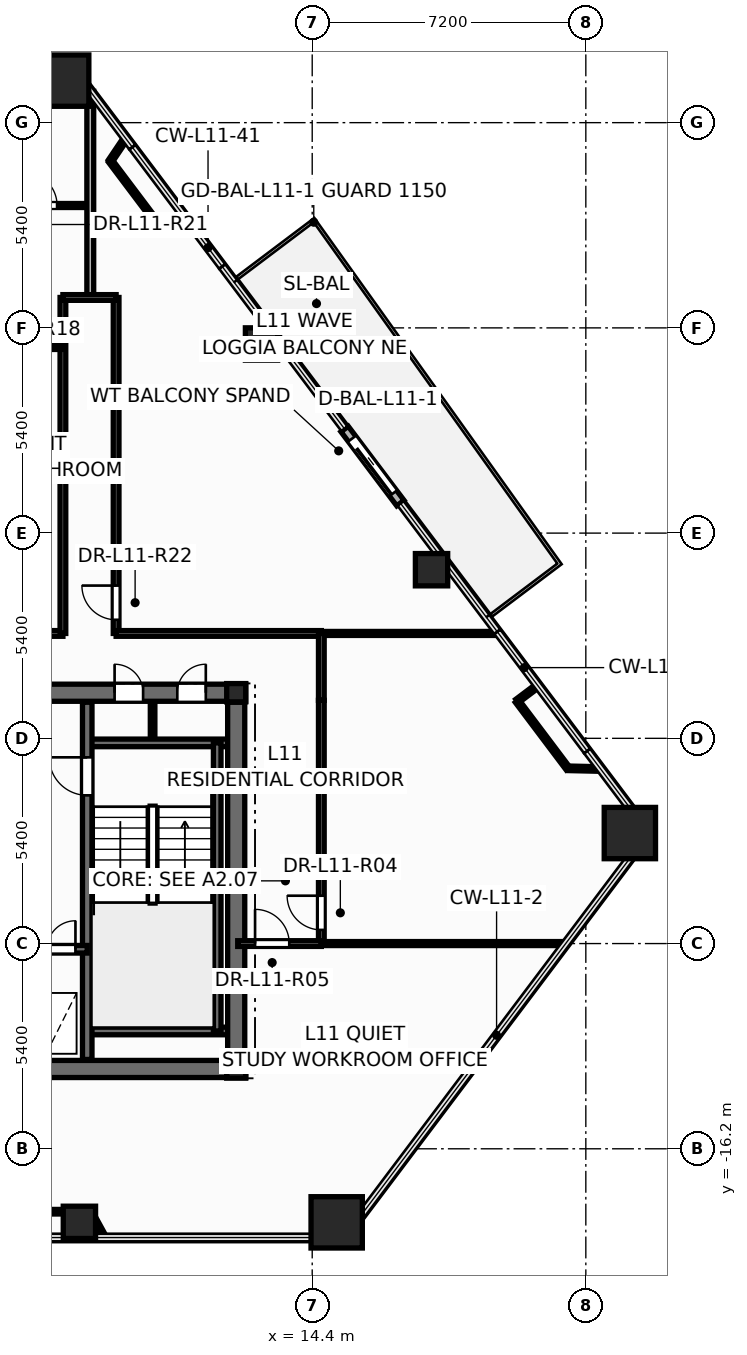
"""IFC4 building model, lengths in metres.
Left out: names, types, materials, properties, quantities, classifications, styles, units other than length and angle.
Written with IfcOpenShell. Run it as: python <this file> out.ifc"""

import sys

from ifc_helpers import new_model, si_unit, direction, frame, frame_2d, origin, origin_2d, place, context, subcontext, project, spatial, rectangle, hollow_rectangle, hollow_circle, i_section, extrude, element, fill, save


model = new_model("IFC4")
c1 = context("Model", 3, precision=1e-05, world=origin(), true_north=direction((0.0, 1.0)))
c2 = subcontext(c1, "Body", "Model", "MODEL_VIEW")
j1 = project(units=[si_unit("LENGTHUNIT", "METRE"), si_unit("PLANEANGLEUNIT", "RADIAN")], contexts=[c1])
p1 = place(None, origin())
s1 = spatial("IfcSite", under=j1, at=p1, CompositionType="ELEMENT")
p2 = place(p1, origin())
s2 = spatial("IfcBuilding", under=s1, at=p2, CompositionType="ELEMENT")
p3 = place(p2, frame((0.0, 0.0, 45.9)))
s3 = spatial("IfcBuildingStorey", under=s2, at=p3, CompositionType="ELEMENT", Elevation=45.9)
for number, where, z_axis, x_axis in (
    (1, (15.044, -18.135, 0.0), (0.0, 0.0, 1.0), (1.0, 0.0, 0.0)),
    (2, (22.759, -7.892, 0.0), (0.0, 0.0, 1.0), (1.0, 0.0, 0.0)),
    (3, (7.847, 11.906, 0.0), (0.0, 0.0, 1.0), (1.0, 0.0, 0.0)),
):
    element("IfcColumn", number, at=place(p3, frame(where, z_axis=z_axis, x_axis=x_axis)), inside=s3, PredefinedType="COLUMN", context=c2, shape_type="SweptSolid", body=[
        extrude(hollow_rectangle(XDim=1.35, YDim=1.35, WallThickness=0.065, at=origin_2d()), origin(), (0.0, 0.0, 1.0), 3.6),
    ])
for number, where, z_axis, x_axis in (
    (4, (8.274, -18.135, 0.0), (0.0, 0.0, 1.0), (1.0, 0.0, 0.0)),
    (5, (17.54, -0.963, 0.0), (0.0, 0.0, 1.0), (1.0, 0.0, 0.0)),
    (6, (13.066, 4.976, 0.0), (0.0, 0.0, 1.0), (1.0, 0.0, 0.0)),
):
    element("IfcColumn", number, at=place(p3, frame(where, z_axis=z_axis, x_axis=x_axis)), inside=s3, PredefinedType="COLUMN", context=c2, shape_type="SweptSolid", body=[
        extrude(hollow_circle(Radius=0.425, WallThickness=0.038, at=origin_2d()), origin(), (0.0, 0.0, 1.0), 3.6),
    ])
for number, where, z_axis, x_axis in (
    (7, (12.4, -14.1, 0.0), (0.0, 0.0, 1.0), (1.0, 0.0, 0.0)),
    (8, (12.4, -4.2, 0.0), (0.0, 0.0, 1.0), (1.0, 0.0, 0.0)),
):
    element("IfcColumn", number, at=place(p3, frame(where, z_axis=z_axis, x_axis=x_axis)), inside=s3, PredefinedType="COLUMN", context=c2, shape_type="SweptSolid", body=[
        extrude(i_section(OverallWidth=0.5, OverallDepth=0.482, WebThickness=0.04, FlangeThickness=0.045, at=origin_2d()), origin(), (0.0, 0.0, 1.0), 3.6),
    ])
p4 = place(p3, frame((16.72, 0.79, -0.015), z_axis=(0.0, 0.0, 1.0), x_axis=(-0.601647678338, 0.798761585926, 0.0)))
e9 = element("IfcWall", 9, at=p4, inside=s3, PredefinedType="STANDARD", context=c2, shape_type="SweptSolid", body=[
    extrude(rectangle(XDim=2.44, YDim=0.24, at=frame_2d((1.22, 0.0))), origin(), (0.0, 0.0, 1.0), 2.728),
])
p5 = place(p4, frame((0.32, 0.0, 0.015)))
e10 = element("IfcOpeningElement", 10, at=p5, cuts=e9, PredefinedType="OPENING", context=c2, shape_type="SweptSolid", body=[
    extrude(rectangle(XDim=1.806, YDim=2.204, at=frame_2d((0.9, 1.102))), frame((0.0, 0.13, 0.0), z_axis=(0.0, -1.0, 0.0), x_axis=(1.0, 0.0, 0.0)), (0.0, 0.0, 1.0), 0.26),
])
p6 = place(p3, frame((10.2, -5.52, 0.0), z_axis=(0.0, 0.0, 1.0), x_axis=(0.0, 1.0, 0.0)))
e11 = element("IfcWall", 11, at=p6, inside=s3, PredefinedType="PARTITIONING", context=c2, shape_type="SweptSolid", body=[
    extrude(rectangle(XDim=1.12, YDim=0.12, at=frame_2d((0.56, 0.0))), origin(), (0.0, 0.0, 1.0), 3.35),
])
p7 = place(p3, frame((-12.65, -14.1, 0.0), z_axis=(0.0, 0.0, 1.0), x_axis=(1.0, 0.0, 0.0)))
e12 = element("IfcWall", 12, at=p7, inside=s3, PredefinedType="SHEAR", context=c2, shape_type="SweptSolid", body=[
    extrude(rectangle(XDim=25.3, YDim=0.45, at=frame_2d((12.65, 0.0))), origin(), (0.0, 0.0, 1.0), 3.6),
])
p8 = place(p3, frame((-12.65, -4.2, 0.0), z_axis=(0.0, 0.0, 1.0), x_axis=(1.0, 0.0, 0.0)))
e13 = element("IfcWall", 13, at=p8, inside=s3, PredefinedType="SHEAR", context=c2, shape_type="SweptSolid", body=[
    extrude(rectangle(XDim=25.3, YDim=0.45, at=frame_2d((12.65, 0.0))), origin(), (0.0, 0.0, 1.0), 3.6),
])
p9 = place(p8, frame((0.95, 0.0, 0.0)))
e14 = element("IfcOpeningElement", 14, at=p9, cuts=e13, PredefinedType="OPENING", context=c2, shape_type="SweptSolid", body=[
    extrude(rectangle(XDim=0.756, YDim=2.054, at=frame_2d((0.375, 1.027))), frame((0.0, 0.235, 0.0), z_axis=(0.0, -1.0, 0.0), x_axis=(1.0, 0.0, 0.0)), (0.0, 0.0, 1.0), 0.47),
])
p10 = place(p8, frame((2.6, 0.0, 0.0)))
e15 = element("IfcOpeningElement", 15, at=p10, cuts=e13, PredefinedType="OPENING", context=c2, shape_type="SweptSolid", body=[
    extrude(rectangle(XDim=0.756, YDim=2.054, at=frame_2d((0.375, 1.027))), frame((0.0, 0.235, 0.0), z_axis=(0.0, -1.0, 0.0), x_axis=(1.0, 0.0, 0.0)), (0.0, 0.0, 1.0), 0.47),
])
p11 = place(p8, frame((21.85, 0.0, 0.0)))
e16 = element("IfcOpeningElement", 16, at=p11, cuts=e13, PredefinedType="OPENING", context=c2, shape_type="SweptSolid", body=[
    extrude(rectangle(XDim=0.756, YDim=2.054, at=frame_2d((0.375, 1.027))), frame((0.0, 0.235, 0.0), z_axis=(0.0, -1.0, 0.0), x_axis=(1.0, 0.0, 0.0)), (0.0, 0.0, 1.0), 0.47),
])
p12 = place(p8, frame((23.5, 0.0, 0.0)))
e17 = element("IfcOpeningElement", 17, at=p12, cuts=e13, PredefinedType="OPENING", context=c2, shape_type="SweptSolid", body=[
    extrude(rectangle(XDim=0.756, YDim=2.054, at=frame_2d((0.375, 1.027))), frame((0.0, 0.235, 0.0), z_axis=(0.0, -1.0, 0.0), x_axis=(1.0, 0.0, 0.0)), (0.0, 0.0, 1.0), 0.47),
])
p13 = place(p8, frame((5.85, 0.0, 0.0)))
e18 = element("IfcOpeningElement", 18, at=p13, cuts=e13, PredefinedType="OPENING", context=c2, shape_type="SweptSolid", body=[
    extrude(rectangle(XDim=1.006, YDim=2.104, at=frame_2d((0.5, 1.052))), frame((0.0, 0.235, 0.0), z_axis=(0.0, -1.0, 0.0), x_axis=(1.0, 0.0, 0.0)), (0.0, 0.0, 1.0), 0.47),
])
p14 = place(p8, frame((10.35, 0.0, 0.0)))
e19 = element("IfcOpeningElement", 19, at=p14, cuts=e13, PredefinedType="OPENING", context=c2, shape_type="SweptSolid", body=[
    extrude(rectangle(XDim=1.406, YDim=2.154, at=frame_2d((0.7, 1.077))), frame((0.0, 0.235, 0.0), z_axis=(0.0, -1.0, 0.0), x_axis=(1.0, 0.0, 0.0)), (0.0, 0.0, 1.0), 0.47),
])
p15 = place(p8, frame((18.45, 0.0, 0.0)))
e20 = element("IfcOpeningElement", 20, at=p15, cuts=e13, PredefinedType="OPENING", context=c2, shape_type="SweptSolid", body=[
    extrude(rectangle(XDim=1.006, YDim=2.104, at=frame_2d((0.5, 1.052))), frame((0.0, 0.235, 0.0), z_axis=(0.0, -1.0, 0.0), x_axis=(1.0, 0.0, 0.0)), (0.0, 0.0, 1.0), 0.47),
])
for number, where, z_axis, x_axis in (
    (21, (8.48, -5.52, 0.0), (0.0, 0.0, 1.0), (1.0, 0.0, 0.0)),
    (22, (8.48, -13.1, 0.0), (0.0, 0.0, 1.0), (1.0, 0.0, 0.0)),
):
    element("IfcWall", number, at=place(p3, frame(where, z_axis=z_axis, x_axis=x_axis)), inside=s3, PredefinedType="SOLIDWALL", context=c2, shape_type="SweptSolid", body=[
        extrude(rectangle(XDim=3.87, YDim=0.2, at=frame_2d((1.935, 0.0))), origin(), (0.0, 0.0, 1.0), 3.6),
    ])
p16 = place(p3, frame((11.9, -13.1, 0.0), z_axis=(0.0, 0.0, 1.0), x_axis=(0.0, 1.0, 0.0)))
e23 = element("IfcWall", 23, at=p16, inside=s3, PredefinedType="SOLIDWALL", context=c2, shape_type="SweptSolid", body=[
    extrude(rectangle(XDim=7.58, YDim=0.2, at=frame_2d((3.79, 0.0))), origin(), (0.0, 0.0, 1.0), 3.6),
])
p17 = place(p3, frame((8.48, -13.85, 0.0), z_axis=(0.0, 0.0, 1.0), x_axis=(0.0, 1.0, 0.0)))
e24 = element("IfcWall", 24, at=p17, inside=s3, PredefinedType="SHEAR", context=c2, shape_type="SweptSolid", body=[
    extrude(rectangle(XDim=9.4, YDim=0.25, at=frame_2d((4.7, 0.0))), origin(), (0.0, 0.0, 1.0), 3.6),
])
p18 = place(p17, frame((6.95, 0.0, 0.0)))
e25 = element("IfcOpeningElement", 25, at=p18, cuts=e24, PredefinedType="OPENING", context=c2, shape_type="SweptSolid", body=[
    extrude(rectangle(XDim=1.006, YDim=2.104, at=frame_2d((0.5, 1.052))), frame((0.0, 0.135, 0.0), z_axis=(0.0, -1.0, 0.0), x_axis=(1.0, 0.0, 0.0)), (0.0, 0.0, 1.0), 0.27),
])
p19 = place(p3, frame((5.12, -10.95, 0.0), z_axis=(0.0, 0.0, 1.0), x_axis=(1.0, 0.0, 0.0)))
e26 = element("IfcWall", 26, at=p19, inside=s3, PredefinedType="SOLIDWALL", context=c2, shape_type="SweptSolid", body=[
    extrude(rectangle(XDim=3.36, YDim=0.2, at=frame_2d((1.68, 0.0))), origin(), (0.0, 0.0, 1.0), 3.6),
])
p20 = place(p19, frame((0.42, 0.0, 0.0)))
e27 = element("IfcOpeningElement", 27, at=p20, cuts=e26, PredefinedType="OPENING", context=c2, shape_type="SweptSolid", body=[
    extrude(rectangle(XDim=1.106, YDim=2.104, at=frame_2d((0.55, 1.052))), frame((0.0, 0.11, 0.0), z_axis=(0.0, -1.0, 0.0), x_axis=(1.0, 0.0, 0.0)), (0.0, 0.0, 1.0), 0.22),
])
p21 = place(p19, frame((2.3, 0.0, 0.0)))
e28 = element("IfcOpeningElement", 28, at=p21, cuts=e26, PredefinedType="OPENING", context=c2, shape_type="SweptSolid", body=[
    extrude(rectangle(XDim=0.756, YDim=2.054, at=frame_2d((0.375, 1.027))), frame((0.0, 0.11, 0.0), z_axis=(0.0, -1.0, 0.0), x_axis=(1.0, 0.0, 0.0)), (0.0, 0.0, 1.0), 0.22),
])
p22 = place(p3, frame((12.4, -13.85, 0.0), z_axis=(0.0, 0.0, 1.0), x_axis=(0.0, 1.0, 0.0)))
e29 = element("IfcWall", 29, at=p22, inside=s3, PredefinedType="SHEAR", context=c2, shape_type="SweptSolid", body=[
    extrude(rectangle(XDim=9.4, YDim=0.45, at=frame_2d((4.7, 0.0))), origin(), (0.0, 0.0, 1.0), 3.6),
])
p23 = place(p3, frame((9.24, -2.64, 0.0), z_axis=(0.0, 0.0, 1.0), x_axis=(0.0, 1.0, 0.0)))
e30 = element("IfcWall", 30, at=p23, inside=s3, PredefinedType="PARTITIONING", context=c2, shape_type="SweptSolid", body=[
    extrude(rectangle(XDim=8.84, YDim=0.15, at=frame_2d((4.42, 0.0))), origin(), (0.0, 0.0, 1.0), 2.509),
])
p24 = place(p23, frame((0.359, 0.0, 0.0)))
e31 = element("IfcOpeningElement", 31, at=p24, cuts=e30, PredefinedType="OPENING", context=c2, shape_type="SweptSolid", body=[
    extrude(rectangle(XDim=0.906, YDim=2.104, at=frame_2d((0.45, 1.052))), frame((0.0, 0.085, 0.0), z_axis=(0.0, -1.0, 0.0), x_axis=(1.0, 0.0, 0.0)), (0.0, 0.0, 1.0), 0.17),
])
p25 = place(p3, frame((14.64, -10.8, 0.0), z_axis=(0.0, 0.0, 1.0), x_axis=(1.0, 0.0, 0.0)))
e32 = element("IfcWall", 32, at=p25, inside=s3, PredefinedType="PARTITIONING", context=c2, shape_type="SweptSolid", body=[
    extrude(rectangle(XDim=6.43, YDim=0.105, at=frame_2d((3.215, 0.0))), origin(), (0.0, 0.0, 1.0), 2.713),
])
p26 = place(p3, frame((14.64, -10.8, 0.0), z_axis=(0.0, 0.0, 1.0), x_axis=(0.0, 1.0, 0.0)))
e33 = element("IfcWall", 33, at=p26, inside=s3, PredefinedType="PARTITIONING", context=c2, shape_type="SweptSolid", body=[
    extrude(rectangle(XDim=6.4, YDim=0.15, at=frame_2d((3.2, 0.0))), origin(), (0.0, 0.0, 1.0), 2.325),
])
p27 = place(p26, frame((0.359, 0.0, 0.0)))
e34 = element("IfcOpeningElement", 34, at=p27, cuts=e33, PredefinedType="OPENING", context=c2, shape_type="SweptSolid", body=[
    extrude(rectangle(XDim=0.906, YDim=2.104, at=frame_2d((0.45, 1.052))), frame((0.0, 0.085, 0.0), z_axis=(0.0, -1.0, 0.0), x_axis=(1.0, 0.0, 0.0)), (0.0, 0.0, 1.0), 0.17),
])
p28 = place(p3, frame((2.8, 8.62, 0.0), z_axis=(0.0, 0.0, 1.0), x_axis=(1.0, 0.0, 0.0)))
e35 = element("IfcWall", 35, at=p28, inside=s3, PredefinedType="PARTITIONING", context=c2, shape_type="SweptSolid", body=[
    extrude(rectangle(XDim=5.76, YDim=0.105, at=frame_2d((2.88, 0.0))), origin(), (0.0, 0.0, 1.0), 2.509),
])
p29 = place(p28, frame((4.007, 0.0, 0.0)))
e36 = element("IfcOpeningElement", 36, at=p29, cuts=e35, PredefinedType="OPENING", context=c2, shape_type="SweptSolid", body=[
    extrude(rectangle(XDim=0.886, YDim=2.104, at=frame_2d((0.44, 1.052))), frame((0.0, 0.062, 0.0), z_axis=(0.0, -1.0, 0.0), x_axis=(1.0, 0.0, 0.0)), (0.0, 0.0, 1.0), 0.125),
])
p30 = place(p3, frame((9.24, -2.64, 0.0), z_axis=(0.0, 0.0, 1.0), x_axis=(1.0, 0.0, 0.0)))
e37 = element("IfcWall", 37, at=p30, inside=s3, PredefinedType="PARTITIONING", context=c2, shape_type="SweptSolid", body=[
    extrude(rectangle(XDim=5.4, YDim=0.15, at=frame_2d((2.7, 0.0))), origin(), (0.0, 0.0, 1.0), 3.35),
])
p31 = place(p3, frame((2.74, -2.64, 0.0), z_axis=(0.0, 0.0, 1.0), x_axis=(1.0, 0.0, 0.0)))
e38 = element("IfcWall", 38, at=p31, inside=s3, PredefinedType="PARTITIONING", context=c2, shape_type="SweptSolid", body=[
    extrude(rectangle(XDim=5.1, YDim=0.15, at=frame_2d((2.55, 0.0))), origin(), (0.0, 0.0, 1.0), 2.325),
])
p32 = place(p31, frame((0.4, 0.0, 0.0)))
e39 = element("IfcOpeningElement", 39, at=p32, cuts=e38, PredefinedType="OPENING", context=c2, shape_type="SweptSolid", body=[
    extrude(rectangle(XDim=0.906, YDim=2.104, at=frame_2d((0.45, 1.052))), frame((0.0, 0.085, 0.0), z_axis=(0.0, -1.0, 0.0), x_axis=(1.0, 0.0, 0.0)), (0.0, 0.0, 1.0), 0.17),
])
p33 = place(p3, frame((7.84, -2.64, 0.0), z_axis=(0.0, 0.0, 1.0), x_axis=(0.0, 1.0, 0.0)))
e40 = element("IfcWall", 40, at=p33, inside=s3, PredefinedType="PARTITIONING", context=c2, shape_type="SweptSolid", body=[
    extrude(rectangle(XDim=8.84, YDim=0.15, at=frame_2d((4.42, 0.0))), origin(), (0.0, 0.0, 1.0), 2.509),
])
p34 = place(p3, frame((14.64, -2.64, 0.0), z_axis=(0.0, 0.0, 1.0), x_axis=(1.0, 0.0, 0.0)))
e41 = element("IfcWall", 41, at=p34, inside=s3, PredefinedType="PARTITIONING", context=c2, shape_type="SweptSolid", body=[
    extrude(rectangle(XDim=4.664, YDim=0.105, at=frame_2d((2.332, 0.0))), origin(), (0.0, 0.0, 1.0), 2.713),
])
p35 = place(p3, frame((5.145, -17.856, 0.0), z_axis=(0.0, 0.0, 1.0), x_axis=(1.0, 0.0, 0.0)))
e42 = element("IfcWall", 42, at=p35, inside=s3, PredefinedType="PARTITIONING", context=c2, shape_type="SweptSolid", body=[
    extrude(rectangle(XDim=3.411, YDim=0.12, at=frame_2d((1.706, 0.0))), origin(), (0.0, 0.0, 1.0), 2.713),
])
p36 = place(p3, frame((8.56, 6.2, 0.0), z_axis=(0.0, 0.0, 1.0), x_axis=(0.0, 1.0, 0.0)))
e43 = element("IfcWall", 43, at=p36, inside=s3, PredefinedType="PARTITIONING", context=c2, shape_type="SweptSolid", body=[
    extrude(rectangle(XDim=5.425, YDim=0.18, at=frame_2d((2.712, 0.0))), origin(), (0.0, 0.0, 1.0), 2.509),
])
p37 = place(p3, frame((10.421, 8.023, 0.0), z_axis=(0.0, 0.0, 1.0), x_axis=(-0.601604540601, 0.798794076548, 0.0)))
e44 = element("IfcWall", 44, at=p37, inside=s3, PredefinedType="PARTITIONING", context=c2, shape_type="SweptSolid", body=[
    extrude(rectangle(XDim=2.214, YDim=0.12, at=frame_2d((1.107, 0.0))), origin(), (0.0, 0.0, 1.0), 3.35),
])
p38 = place(p3, frame((12.44, -10.8, 0.0), z_axis=(0.0, 0.0, 1.0), x_axis=(1.0, 0.0, 0.0)))
e45 = element("IfcWall", 45, at=p38, inside=s3, PredefinedType="PARTITIONING", context=c2, shape_type="SweptSolid", body=[
    extrude(rectangle(XDim=2.2, YDim=0.15, at=frame_2d((1.1, 0.0))), origin(), (0.0, 0.0, 1.0), 2.713),
])
p39 = place(p38, frame((0.456, 0.0, 0.0)))
e46 = element("IfcOpeningElement", 46, at=p39, cuts=e45, PredefinedType="OPENING", context=c2, shape_type="SweptSolid", body=[
    extrude(rectangle(XDim=0.906, YDim=2.104, at=frame_2d((0.45, 1.052))), frame((0.0, 0.085, 0.0), z_axis=(0.0, -1.0, 0.0), x_axis=(1.0, 0.0, 0.0)), (0.0, 0.0, 1.0), 0.17),
])
p40 = place(p3, frame((14.64, -4.4, 0.0), z_axis=(0.0, 0.0, 1.0), x_axis=(0.0, 1.0, 0.0)))
e47 = element("IfcWall", 47, at=p40, inside=s3, PredefinedType="PARTITIONING", context=c2, shape_type="SweptSolid", body=[
    extrude(rectangle(XDim=1.76, YDim=0.15, at=frame_2d((0.88, 0.0))), origin(), (0.0, 0.0, 1.0), 3.35),
])
p41 = place(p3, frame((6.362, 2.16, 0.0), z_axis=(0.0, 0.0, 1.0), x_axis=(1.0, 0.0, 0.0)))
e48 = element("IfcWall", 48, at=p41, inside=s3, PredefinedType="PARTITIONING", context=c2, shape_type="SweptSolid", body=[
    extrude(rectangle(XDim=1.478, YDim=0.135, at=frame_2d((0.739, 0.0))), origin(), (0.0, 0.0, 1.0), 2.325),
])
p42 = place(p3, frame((21.125, -6.188, 0.0), z_axis=(0.0, 0.0, 1.0), x_axis=(-0.601604540601, 0.798794076548, 0.0)))
e49 = element("IfcWall", 49, at=p42, inside=s3, PredefinedType="PARTITIONING", context=c2, shape_type="SweptSolid", body=[
    extrude(rectangle(XDim=2.214, YDim=0.12, at=frame_2d((1.107, 0.0))), origin(), (0.0, 0.0, 1.0), 3.35),
])
p43 = place(p3, frame((6.3, 4.9, 0.0), z_axis=(0.0, 0.0, 1.0), x_axis=(1.0, 0.0, 0.0)))
e50 = element("IfcWall", 50, at=p43, inside=s3, PredefinedType="PARTITIONING", context=c2, shape_type="SweptSolid", body=[
    extrude(rectangle(XDim=1.54, YDim=0.135, at=frame_2d((0.77, 0.0))), origin(), (0.0, 0.0, 1.0), 2.509),
])
p44 = place(p3, frame((21.978, -6.208, 0.0), z_axis=(0.0, 0.0, 1.0), x_axis=(-0.999744633781, 0.022597947373, 0.0)))
e51 = element("IfcWall", 51, at=p44, inside=s3, PredefinedType="PARTITIONING", context=c2, shape_type="SweptSolid", body=[
    extrude(rectangle(XDim=0.854, YDim=0.12, at=frame_2d((0.427, 0.0))), origin(), (0.0, 0.0, 1.0), 2.713),
])
p45 = place(p3, frame((7.84, 6.2, 0.0), z_axis=(0.0, 0.0, 1.0), x_axis=(1.0, 0.0, 0.0)))
e52 = element("IfcWall", 52, at=p45, inside=s3, PredefinedType="PARTITIONING", context=c2, shape_type="SweptSolid", body=[
    extrude(rectangle(XDim=1.4, YDim=0.15, at=frame_2d((0.7, 0.0))), origin(), (0.0, 0.0, 1.0), 3.35),
])
p46 = place(p3, frame((8.556, -17.856, 0.0), z_axis=(0.0, 0.0, 1.0), x_axis=(0.480888080126, -0.87678198795, 0.0)))
e53 = element("IfcWall", 53, at=p46, inside=s3, PredefinedType="PARTITIONING", context=c2, shape_type="SweptSolid", body=[
    extrude(rectangle(XDim=0.764, YDim=0.12, at=frame_2d((0.382, 0.0))), origin(), (0.0, 0.0, 1.0), 2.713),
])
p47 = place(p3, frame((9.089, 9.792, 0.0), z_axis=(0.0, 0.0, 1.0), x_axis=(0.559064577703, 0.82912411493, 0.0)))
e54 = element("IfcWall", 54, at=p47, inside=s3, PredefinedType="PARTITIONING", context=c2, shape_type="SweptSolid", body=[
    extrude(rectangle(XDim=0.709, YDim=0.12, at=frame_2d((0.354, 0.0))), origin(), (0.0, 0.0, 1.0), 2.713),
])
p48 = place(p3, frame((10.956, 8.426, 0.0), z_axis=(0.0, 0.0, 1.0), x_axis=(-0.798905778506, -0.601456197133, 0.0)))
e55 = element("IfcWall", 55, at=p48, inside=s3, PredefinedType="PARTITIONING", context=c2, shape_type="SweptSolid", body=[
    extrude(rectangle(XDim=0.67, YDim=0.12, at=frame_2d((0.335, 0.0))), origin(), (0.0, 0.0, 1.0), 2.713),
])
p49 = place(p3, frame((19.793, -4.42, 0.0), z_axis=(0.0, 0.0, 1.0), x_axis=(0.798949061571, 0.601398700544, 0.0)))
e56 = element("IfcWall", 56, at=p49, inside=s3, PredefinedType="PARTITIONING", context=c2, shape_type="SweptSolid", body=[
    extrude(rectangle(XDim=0.67, YDim=0.12, at=frame_2d((0.335, 0.0))), origin(), (0.0, 0.0, 1.0), 2.713),
])
p50 = place(p5, origin())
e57 = element("IfcDoor", 57, at=p50, inside=s3, OperationType="SLIDING_TO_LEFT", PredefinedType="DOOR", context=c2, shape_type="SweptSolid", body=[
    extrude(rectangle(XDim=1.8, YDim=2.2, at=frame_2d((0.9, 1.1))), frame((0.0, 0.025, 0.0), z_axis=(0.0, -1.0, 0.0), x_axis=(1.0, 0.0, 0.0)), (0.0, 0.0, 1.0), 0.05),
])
fill(e10, e57)
p51 = place(p18, origin())
e58 = element("IfcDoor", 58, at=p51, inside=s3, OperationType="SINGLE_SWING_RIGHT", PredefinedType="DOOR", context=c2, shape_type="SweptSolid", body=[
    extrude(rectangle(XDim=1.0, YDim=2.1, at=frame_2d((0.5, 1.05))), frame((0.0, 0.025, 0.0), z_axis=(0.0, -1.0, 0.0), x_axis=(1.0, 0.0, 0.0)), (0.0, 0.0, 1.0), 0.05),
])
fill(e25, e58)
p52 = place(p21, origin())
e59 = element("IfcDoor", 59, at=p52, inside=s3, OperationType="SINGLE_SWING_RIGHT", PredefinedType="DOOR", context=c2, shape_type="SweptSolid", body=[
    extrude(rectangle(XDim=0.75, YDim=2.05, at=frame_2d((0.375, 1.025))), frame((0.0, 0.025, 0.0), z_axis=(0.0, -1.0, 0.0), x_axis=(1.0, 0.0, 0.0)), (0.0, 0.0, 1.0), 0.05),
])
fill(e28, e59)
p53 = place(p11, origin())
e60 = element("IfcDoor", 60, at=p53, inside=s3, OperationType="SINGLE_SWING_LEFT", PredefinedType="DOOR", context=c2, shape_type="SweptSolid", body=[
    extrude(rectangle(XDim=0.75, YDim=2.05, at=frame_2d((0.375, 1.025))), frame((0.0, 0.025, 0.0), z_axis=(0.0, -1.0, 0.0), x_axis=(1.0, 0.0, 0.0)), (0.0, 0.0, 1.0), 0.05),
])
fill(e16, e60)
p54 = place(p12, origin())
e61 = element("IfcDoor", 61, at=p54, inside=s3, OperationType="SINGLE_SWING_RIGHT", PredefinedType="DOOR", context=c2, shape_type="SweptSolid", body=[
    extrude(rectangle(XDim=0.75, YDim=2.05, at=frame_2d((0.375, 1.025))), frame((0.0, 0.025, 0.0), z_axis=(0.0, -1.0, 0.0), x_axis=(1.0, 0.0, 0.0)), (0.0, 0.0, 1.0), 0.05),
])
fill(e17, e61)
p55 = place(p27, origin())
e62 = element("IfcDoor", 62, at=p55, inside=s3, OperationType="SINGLE_SWING_RIGHT", PredefinedType="DOOR", context=c2, shape_type="SweptSolid", body=[
    extrude(rectangle(XDim=0.9, YDim=2.1, at=frame_2d((0.45, 1.05))), frame((0.0, 0.025, 0.0), z_axis=(0.0, -1.0, 0.0), x_axis=(1.0, 0.0, 0.0)), (0.0, 0.0, 1.0), 0.05),
])
fill(e34, e62)
p56 = place(p39, origin())
e63 = element("IfcDoor", 63, at=p56, inside=s3, OperationType="SINGLE_SWING_LEFT", PredefinedType="DOOR", context=c2, shape_type="SweptSolid", body=[
    extrude(rectangle(XDim=0.9, YDim=2.1, at=frame_2d((0.45, 1.05))), frame((0.0, 0.025, 0.0), z_axis=(0.0, -1.0, 0.0), x_axis=(1.0, 0.0, 0.0)), (0.0, 0.0, 1.0), 0.05),
])
fill(e46, e63)
p57 = place(p29, origin())
e64 = element("IfcDoor", 64, at=p57, inside=s3, OperationType="SINGLE_SWING_LEFT", PredefinedType="DOOR", context=c2, shape_type="SweptSolid", body=[
    extrude(rectangle(XDim=0.88, YDim=2.1, at=frame_2d((0.44, 1.05))), frame((0.0, 0.025, 0.0), z_axis=(0.0, -1.0, 0.0), x_axis=(1.0, 0.0, 0.0)), (0.0, 0.0, 1.0), 0.05),
])
fill(e36, e64)
p58 = place(p24, origin())
e65 = element("IfcDoor", 65, at=p58, inside=s3, OperationType="SINGLE_SWING_RIGHT", PredefinedType="DOOR", context=c2, shape_type="SweptSolid", body=[
    extrude(rectangle(XDim=0.9, YDim=2.1, at=frame_2d((0.45, 1.05))), frame((0.0, 0.025, 0.0), z_axis=(0.0, -1.0, 0.0), x_axis=(1.0, 0.0, 0.0)), (0.0, 0.0, 1.0), 0.05),
])
fill(e31, e65)
save(model, sys.argv[1])
